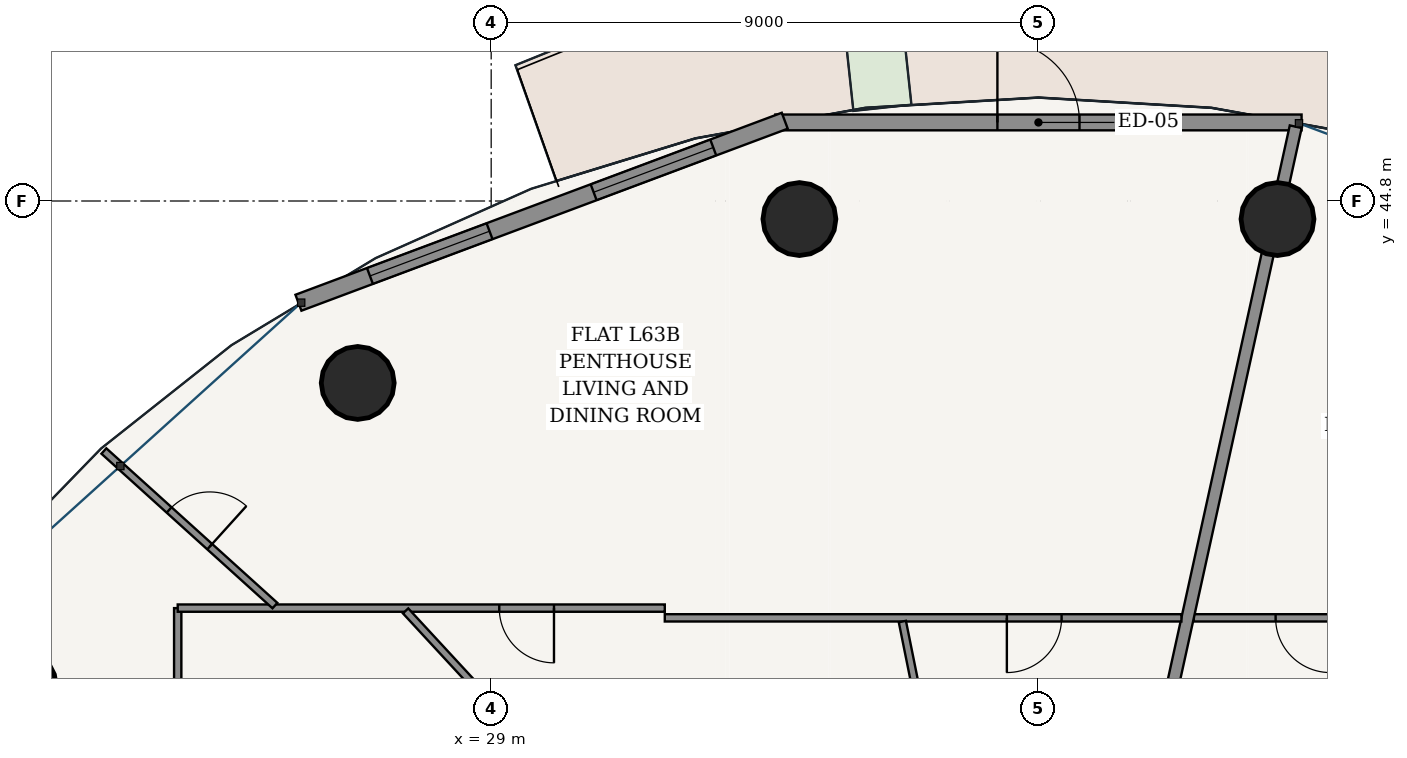
"""IFC4 building model, lengths in metres.
Left out: names, types, materials, properties, quantities, classifications, styles, units other than length and angle.
Written with IfcOpenShell. Run it as: python <this file> out.ifc"""

import sys

from ifc_helpers import new_model, si_unit, direction, frame, frame_2d, origin, origin_2d, place, context, subcontext, project, spatial, rectangle, hollow_circle, extrude, source, transform, mapped, element, fill, save


model = new_model("IFC4")
c1 = context("Model", 3, precision=1e-05, world=origin(), true_north=direction((-0.2419218956, 0.970295726276)))
c2 = subcontext(c1, "Body", "Model", "MODEL_VIEW")
j1 = project(units=[si_unit("LENGTHUNIT", "METRE"), si_unit("PLANEANGLEUNIT", "RADIAN")], contexts=[c1])
p1 = place(None, origin())
s1 = spatial("IfcSite", under=j1, at=p1, CompositionType="ELEMENT")
p2 = place(p1, origin())
s2 = spatial("IfcBuilding", under=s1, at=p2, CompositionType="ELEMENT")
p3 = place(p2, frame((0.0, 0.0, 239.3)))
s3 = spatial("IfcBuildingStorey", under=s2, at=p3, CompositionType="ELEMENT", Elevation=239.3)
for number, where, z_axis, x_axis in (
    (1, (41.931, 44.503, 0.0), (0.0, 0.0, 1.0), (1.0, 0.0, 0.0)),
    (2, (34.069, 44.503, 0.0), (0.0, 0.0, 1.0), (1.0, 0.0, 0.0)),
    (3, (26.805, 41.808, 0.0), (0.0, 0.0, 1.0), (1.0, 0.0, 0.0)),
    (4, (21.246, 36.828, 0.0), (0.0, 0.0, 1.0), (1.0, 0.0, 0.0)),
):
    element("IfcColumn", number, at=place(p3, frame(where, z_axis=z_axis, x_axis=x_axis)), inside=s3, PredefinedType="COLUMN", context=c2, shape_type="SweptSolid", body=[
        extrude(hollow_circle(Radius=0.6, WallThickness=0.038, at=origin_2d()), origin(), (0.0, 0.0, 1.0), 3.7),
    ])
p4 = place(p3, frame((42.327, 46.092, 0.0), z_axis=(0.0, 0.0, 1.0), x_axis=(-1.0, 0.0, 0.0)))
e5 = element("IfcWall", 5, at=p4, inside=s3, PredefinedType="SOLIDWALL", context=c2, shape_type="SweptSolid", body=[
    extrude(rectangle(XDim=8.654, YDim=0.26, at=frame_2d((4.327, 0.0))), origin(), (0.0, 0.0, 1.0), 3.25),
])
p5 = place(p4, frame((3.652, 0.0, 0.0)))
e6 = element("IfcOpeningElement", 6, at=p5, cuts=e5, PredefinedType="OPENING", context=c2, shape_type="SweptSolid", body=[
    extrude(rectangle(XDim=1.35, YDim=2.2, at=frame_2d((0.675, 1.1))), frame((0.0, 0.14, 0.0), z_axis=(0.0, -1.0, 0.0), x_axis=(1.0, 0.0, 0.0)), (0.0, 0.0, 1.0), 0.28),
])
p6 = place(p3, frame((33.828, 46.12, 0.0), z_axis=(0.0, 0.0, 1.0), x_axis=(-0.936556918375, -0.350515532672, 0.0)))
e7 = element("IfcWall", 7, at=p6, inside=s3, PredefinedType="SOLIDWALL", context=c2, shape_type="SweptSolid", body=[
    extrude(rectangle(XDim=8.539, YDim=0.28, at=frame_2d((4.27, 0.0))), origin(), (0.0, 0.0, 1.0), 3.25),
])
p7 = place(p6, frame((1.256, 0.0, 0.85)))
e8 = element("IfcOpeningElement", 8, at=p7, cuts=e7, PredefinedType="OPENING", context=c2, shape_type="SweptSolid", body=[
    extrude(rectangle(XDim=2.1, YDim=1.95, at=frame_2d((1.05, 0.975))), frame((0.0, 0.15, 0.0), z_axis=(0.0, -1.0, 0.0), x_axis=(1.0, 0.0, 0.0)), (0.0, 0.0, 1.0), 0.3),
])
p8 = place(p6, frame((5.184, 0.0, 0.85)))
e9 = element("IfcOpeningElement", 9, at=p8, cuts=e7, PredefinedType="OPENING", context=c2, shape_type="SweptSolid", body=[
    extrude(rectangle(XDim=2.1, YDim=1.95, at=frame_2d((1.05, 0.975))), frame((0.0, 0.15, 0.0), z_axis=(0.0, -1.0, 0.0), x_axis=(1.0, 0.0, 0.0)), (0.0, 0.0, 1.0), 0.3),
])
p9 = place(p3, frame((40.555, 37.945, 0.0), z_axis=(0.0, 0.0, 1.0), x_axis=(1.0, 0.0, 0.0)))
e10 = element("IfcWall", 10, at=p9, inside=s3, PredefinedType="PARTITIONING", context=c2, shape_type="SweptSolid", body=[
    extrude(rectangle(XDim=3.59, YDim=0.12, at=frame_2d((1.795, 0.0))), origin(), (0.0, 0.0, 1.0), 3.25),
])
p10 = place(p9, frame((1.345, 0.0, 0.0)))
e11 = element("IfcOpeningElement", 11, at=p10, cuts=e10, PredefinedType="OPENING", context=c2, shape_type="SweptSolid", body=[
    extrude(rectangle(XDim=0.9, YDim=2.15, at=frame_2d((0.45, 1.075))), frame((0.0, 0.07, 0.0), z_axis=(0.0, -1.0, 0.0), x_axis=(1.0, 0.0, 0.0)), (0.0, 0.0, 1.0), 0.14),
])
p11 = place(p3, frame((39.811, 35.027, 0.0), z_axis=(0.0, 0.0, 1.0), x_axis=(0.214966857327, 0.976621344356, 0.0)))
e12 = element("IfcWall", 12, at=p11, inside=s3, PredefinedType="PARTITIONING", context=c2, shape_type="SweptSolid", body=[
    extrude(rectangle(XDim=11.258, YDim=0.2, at=frame_2d((5.629, 0.0))), origin(), (0.0, 0.0, 1.0), 2.34),
])
p12 = place(p3, frame((23.845, 26.902, 0.0), z_axis=(0.0, 0.0, 1.0), x_axis=(0.0, 1.0, 0.0)))
e13 = element("IfcWall", 13, at=p12, inside=s3, PredefinedType="PARTITIONING", context=c2, shape_type="SweptSolid", body=[
    extrude(rectangle(XDim=11.203, YDim=0.12, at=frame_2d((5.602, 0.0))), origin(), (0.0, 0.0, 1.0), 2.775),
])
p13 = place(p12, frame((2.276, 0.0, 0.0)))
e14 = element("IfcOpeningElement", 14, at=p13, cuts=e13, PredefinedType="OPENING", context=c2, shape_type="SweptSolid", body=[
    extrude(rectangle(XDim=0.9, YDim=2.15, at=frame_2d((0.45, 1.075))), frame((0.0, 0.07, 0.0), z_axis=(0.0, -1.0, 0.0), x_axis=(1.0, 0.0, 0.0)), (0.0, 0.0, 1.0), 0.14),
])
p14 = place(p3, frame((23.845, 38.105, 0.0), z_axis=(0.0, 0.0, 1.0), x_axis=(1.0, 0.0, 0.0)))
e15 = element("IfcWall", 15, at=p14, inside=s3, PredefinedType="PARTITIONING", context=c2, shape_type="SweptSolid", body=[
    extrude(rectangle(XDim=8.01, YDim=0.12, at=frame_2d((4.005, 0.0))), origin(), (0.0, 0.0, 1.0), 2.775),
])
p15 = place(p14, frame((5.288, 0.0, 0.0)))
e16 = element("IfcOpeningElement", 16, at=p15, cuts=e15, PredefinedType="OPENING", context=c2, shape_type="SweptSolid", body=[
    extrude(rectangle(XDim=0.9, YDim=2.15, at=frame_2d((0.45, 1.075))), frame((0.0, 0.07, 0.0), z_axis=(0.0, -1.0, 0.0), x_axis=(1.0, 0.0, 0.0)), (0.0, 0.0, 1.0), 0.14),
])
p16 = place(p3, frame((31.855, 37.945, 0.0), z_axis=(0.0, 0.0, 1.0), x_axis=(1.0, 0.0, 0.0)))
e17 = element("IfcWall", 17, at=p16, inside=s3, PredefinedType="PARTITIONING", context=c2, shape_type="SweptSolid", body=[
    extrude(rectangle(XDim=8.496, YDim=0.12, at=frame_2d((4.248, 0.0))), origin(), (0.0, 0.0, 1.0), 2.775),
])
p17 = place(p16, frame((5.625, 0.0, 0.0)))
e18 = element("IfcOpeningElement", 18, at=p17, cuts=e17, PredefinedType="OPENING", context=c2, shape_type="SweptSolid", body=[
    extrude(rectangle(XDim=0.9, YDim=2.15, at=frame_2d((0.45, 1.075))), frame((0.0, 0.07, 0.0), z_axis=(0.0, -1.0, 0.0), x_axis=(1.0, 0.0, 0.0)), (0.0, 0.0, 1.0), 0.14),
])
p18 = place(p3, frame((25.444, 38.146, 0.0), z_axis=(0.0, 0.0, 1.0), x_axis=(-0.741941434687, 0.670464695189, 0.0)))
e19 = element("IfcWall", 19, at=p18, inside=s3, PredefinedType="PARTITIONING", context=c2, shape_type="SweptSolid", body=[
    extrude(rectangle(XDim=3.792, YDim=0.12, at=frame_2d((1.896, 0.0))), origin(), (0.0, 0.0, 1.0), 2.881),
])
p19 = place(p18, frame((1.446, 0.0, 0.0)))
e20 = element("IfcOpeningElement", 20, at=p19, cuts=e19, PredefinedType="OPENING", context=c2, shape_type="SweptSolid", body=[
    extrude(rectangle(XDim=0.9, YDim=2.15, at=frame_2d((0.45, 1.075))), frame((0.0, 0.07, 0.0), z_axis=(0.0, -1.0, 0.0), x_axis=(1.0, 0.0, 0.0)), (0.0, 0.0, 1.0), 0.14),
])
p20 = place(p3, frame((36.339, 35.027, 0.0), z_axis=(0.0, 0.0, 1.0), x_axis=(-0.197903570547, 0.980221493727, 0.0)))
e21 = element("IfcWall", 21, at=p20, inside=s3, PredefinedType="PARTITIONING", context=c2, shape_type="SweptSolid", body=[
    extrude(rectangle(XDim=2.915, YDim=0.12, at=frame_2d((1.458, 0.0))), origin(), (0.0, 0.0, 1.0), 2.34),
])
p21 = place(p3, frame((30.396, 35.026, 0.0), z_axis=(0.0, 0.0, 1.0), x_axis=(-0.678748871003, 0.73437045836, 0.0)))
e22 = element("IfcWall", 22, at=p21, inside=s3, PredefinedType="PARTITIONING", context=c2, shape_type="SweptSolid", body=[
    extrude(rectangle(XDim=4.13, YDim=0.12, at=frame_2d((2.065, 0.0))), origin(), (0.0, 0.0, 1.0), 2.775),
])
m1 = source(origin(), c2, "Body", "SweptSolid", [
    extrude(rectangle(XDim=1.35, YDim=2.2, at=frame_2d((0.675, 1.1))), frame((0.0, 0.025, 0.0), z_axis=(0.0, -1.0, 0.0), x_axis=(1.0, 0.0, 0.0)), (0.0, 0.0, 1.0), 0.05),
])
p22 = place(p5, frame((1.35, 0.0, 0.0), z_axis=(0.0, 0.0, 1.0), x_axis=(-1.0, 0.0, 0.0)))
e23 = element("IfcDoor", 23, at=p22, inside=s3, OperationType="SINGLE_SWING_LEFT", PredefinedType="DOOR", context=c2, shape_type="MappedRepresentation", body=[
    mapped(m1, transform((0.0, 0.0, 0.0), scale=1.0)),
])
fill(e6, e23)
m2 = source(origin(), c2, "Body", "SweptSolid", [
    extrude(rectangle(XDim=2.1, YDim=1.95, at=frame_2d((1.05, 0.975))), frame((0.0, 0.03, 0.0), z_axis=(0.0, -1.0, 0.0), x_axis=(1.0, 0.0, 0.0)), (0.0, 0.0, 1.0), 0.06),
])
p23 = place(p7, origin())
e24 = element("IfcWindow", 24, at=p23, inside=s3, PartitioningType="SINGLE_PANEL", PredefinedType="WINDOW", context=c2, shape_type="MappedRepresentation", body=[
    mapped(m2, transform((0.0, 0.0, 0.0), scale=1.0)),
])
fill(e8, e24)
p24 = place(p8, origin())
e25 = element("IfcWindow", 25, at=p24, inside=s3, PartitioningType="SINGLE_PANEL", PredefinedType="WINDOW", context=c2, shape_type="MappedRepresentation", body=[
    mapped(m2, transform((0.0, 0.0, 0.0), scale=1.0)),
])
fill(e9, e25)
m3 = source(origin(), c2, "Body", "SweptSolid", [
    extrude(rectangle(XDim=0.9, YDim=2.15, at=frame_2d((0.45, 1.075))), frame((0.0, 0.025, 0.0), z_axis=(0.0, -1.0, 0.0), x_axis=(1.0, 0.0, 0.0)), (0.0, 0.0, 1.0), 0.05),
])
p25 = place(p10, frame((0.9, 0.0, 0.0), z_axis=(0.0, 0.0, 1.0), x_axis=(-1.0, 0.0, 0.0)))
e26 = element("IfcDoor", 26, at=p25, inside=s3, OperationType="SINGLE_SWING_LEFT", PredefinedType="DOOR", context=c2, shape_type="MappedRepresentation", body=[
    mapped(m3, transform((0.0, 0.0, 0.0), scale=1.0)),
])
fill(e11, e26)
p26 = place(p19, frame((0.9, 0.0, 0.0), z_axis=(0.0, 0.0, 1.0), x_axis=(-1.0, 0.0, 0.0)))
e27 = element("IfcDoor", 27, at=p26, inside=s3, OperationType="SINGLE_SWING_RIGHT", PredefinedType="DOOR", context=c2, shape_type="MappedRepresentation", body=[
    mapped(m3, transform((0.0, 0.0, 0.0), scale=1.0)),
])
fill(e20, e27)
p27 = place(p15, frame((0.9, 0.0, 0.0), z_axis=(0.0, 0.0, 1.0), x_axis=(-1.0, 0.0, 0.0)))
e28 = element("IfcDoor", 28, at=p27, inside=s3, OperationType="SINGLE_SWING_LEFT", PredefinedType="DOOR", context=c2, shape_type="MappedRepresentation", body=[
    mapped(m3, transform((0.0, 0.0, 0.0), scale=1.0)),
])
fill(e16, e28)
p28 = place(p17, frame((0.9, 0.0, 0.0), z_axis=(0.0, 0.0, 1.0), x_axis=(-1.0, 0.0, 0.0)))
e29 = element("IfcDoor", 29, at=p28, inside=s3, OperationType="SINGLE_SWING_RIGHT", PredefinedType="DOOR", context=c2, shape_type="MappedRepresentation", body=[
    mapped(m3, transform((0.0, 0.0, 0.0), scale=1.0)),
])
fill(e18, e29)
save(model, sys.argv[1])
